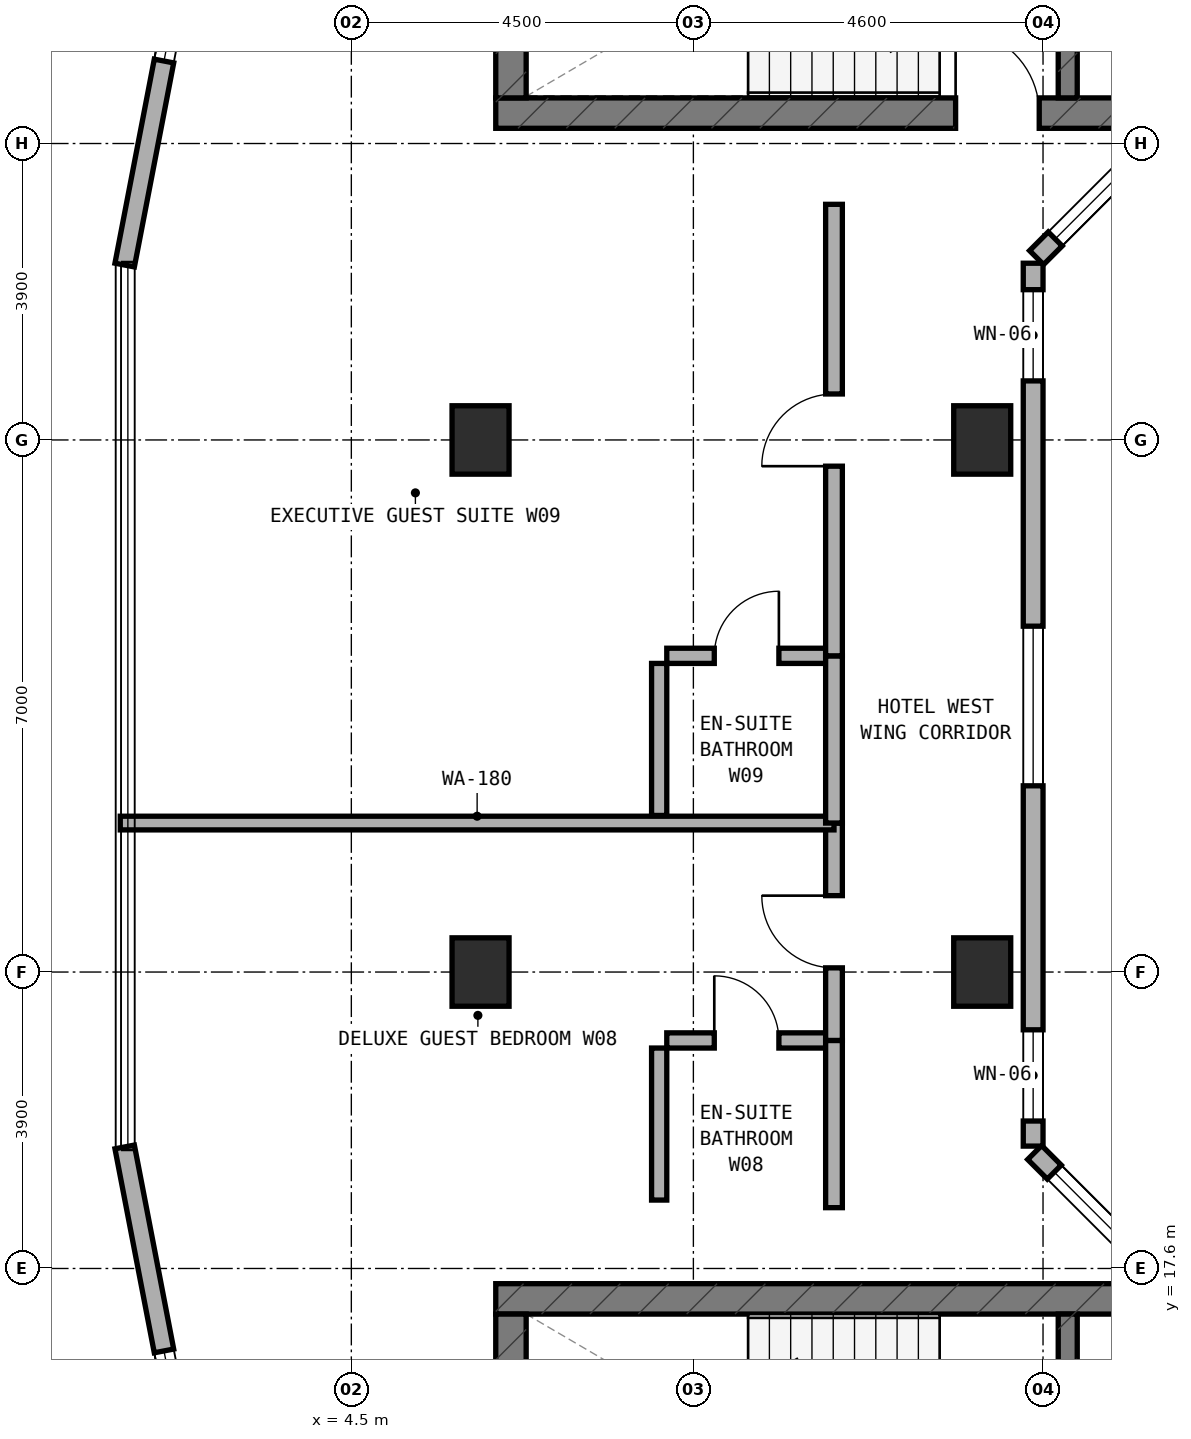
"""IFC4 building model, lengths in metres.
Left out: names, types, materials, properties, quantities, classifications, styles, units other than length and angle.
Written with IfcOpenShell. Run it as: python <this file> out.ifc"""

import sys

from ifc_helpers import new_model, si_unit, direction, frame, frame_2d, origin, origin_2d, place, context, subcontext, project, spatial, rectangle, extrude, element, fill, save


model = new_model("IFC4")
c1 = context("Model", 3, precision=1e-05, world=origin(), true_north=direction((0.0, 1.0)))
c2 = subcontext(c1, "Body", "Model", "MODEL_VIEW")
j1 = project(units=[si_unit("LENGTHUNIT", "METRE"), si_unit("PLANEANGLEUNIT", "RADIAN")], contexts=[c1])
p1 = place(None, origin())
s1 = spatial("IfcSite", under=j1, at=p1, CompositionType="ELEMENT")
p2 = place(p1, origin())
s2 = spatial("IfcBuilding", under=s1, at=p2, CompositionType="ELEMENT")
p3 = place(p2, frame((0.0, 0.0, 177.5)))
s3 = spatial("IfcBuildingStorey", under=s2, at=p3, CompositionType="ELEMENT", Elevation=177.5)
p4 = place(p3, frame((6.4, 32.8, 0.0), z_axis=(0.0, 0.0, 1.0), x_axis=(1.0, 0.0, 0.0)))
e1 = element("IfcWall", 1, at=p4, inside=s3, PredefinedType="SHEAR", context=c2, shape_type="SweptSolid", body=[
    extrude(rectangle(XDim=24.4, YDim=0.4, at=frame_2d((12.2, 0.0))), origin(), (0.0, 0.0, 1.0), 3.6),
])
p5 = place(p4, frame((6.05, 0.0, 0.0)))
e2 = element("IfcOpeningElement", 2, at=p5, cuts=e1, PredefinedType="OPENING", context=c2, shape_type="SweptSolid", body=[
    extrude(rectangle(XDim=1.1, YDim=2.15, at=frame_2d((0.55, 1.075))), frame((0.0, 0.21, 0.0), z_axis=(0.0, -1.0, 0.0), x_axis=(1.0, 0.0, 0.0)), (0.0, 0.0, 1.0), 0.42),
])
p6 = place(p3, frame((6.6, 33.0, 0.0), z_axis=(0.0, 0.0, 1.0), x_axis=(0.0, 1.0, 0.0)))
e3 = element("IfcWall", 3, at=p6, inside=s3, PredefinedType="SHEAR", context=c2, shape_type="SweptSolid", body=[
    extrude(rectangle(XDim=3.16, YDim=0.4, at=frame_2d((1.58, 0.0))), origin(), (0.0, 0.0, 1.0), 3.6),
])
p7 = place(p3, frame((13.925, 33.0, 0.0), z_axis=(0.0, 0.0, 1.0), x_axis=(0.0, 1.0, 0.0)))
e4 = element("IfcWall", 4, at=p7, inside=s3, PredefinedType="STANDARD", context=c2, shape_type="SweptSolid", body=[
    extrude(rectangle(XDim=3.16, YDim=0.25, at=frame_2d((1.58, 0.0))), origin(), (0.0, 0.0, 1.0), 3.32),
])
p8 = place(p7, frame((0.98, 0.0, 0.0)))
e5 = element("IfcOpeningElement", 5, at=p8, cuts=e4, PredefinedType="OPENING", context=c2, shape_type="SweptSolid", body=[
    extrude(rectangle(XDim=1.1, YDim=2.15, at=frame_2d((0.55, 1.075))), frame((0.0, 0.135, 0.0), z_axis=(0.0, -1.0, 0.0), x_axis=(1.0, 0.0, 0.0)), (0.0, 0.0, 1.0), 0.27),
])
p9 = place(p3, frame((6.4, 17.2, 0.0), z_axis=(0.0, 0.0, 1.0), x_axis=(1.0, 0.0, 0.0)))
e6 = element("IfcWall", 6, at=p9, inside=s3, PredefinedType="SHEAR", context=c2, shape_type="SweptSolid", body=[
    extrude(rectangle(XDim=24.4, YDim=0.4, at=frame_2d((12.2, 0.0))), origin(), (0.0, 0.0, 1.0), 3.6),
])
p10 = place(p3, frame((6.6, 13.84, 0.0), z_axis=(0.0, 0.0, 1.0), x_axis=(0.0, 1.0, 0.0)))
e7 = element("IfcWall", 7, at=p10, inside=s3, PredefinedType="SHEAR", context=c2, shape_type="SweptSolid", body=[
    extrude(rectangle(XDim=3.16, YDim=0.4, at=frame_2d((1.58, 0.0))), origin(), (0.0, 0.0, 1.0), 3.6),
])
p11 = place(p3, frame((13.925, 13.84, 0.0), z_axis=(0.0, 0.0, 1.0), x_axis=(0.0, 1.0, 0.0)))
e8 = element("IfcWall", 8, at=p11, inside=s3, PredefinedType="STANDARD", context=c2, shape_type="SweptSolid", body=[
    extrude(rectangle(XDim=3.16, YDim=0.25, at=frame_2d((1.58, 0.0))), origin(), (0.0, 0.0, 1.0), 3.32),
])
p12 = place(p11, frame((0.98, 0.0, 0.0)))
e9 = element("IfcOpeningElement", 9, at=p12, cuts=e8, PredefinedType="OPENING", context=c2, shape_type="SweptSolid", body=[
    extrude(rectangle(XDim=1.1, YDim=2.15, at=frame_2d((0.55, 1.075))), frame((0.0, 0.135, 0.0), z_axis=(0.0, -1.0, 0.0), x_axis=(1.0, 0.0, 0.0)), (0.0, 0.0, 1.0), 0.27),
])
for number, where, z_axis, x_axis in (
    (10, (6.2, 21.5, 0.0), (0.0, 0.0, 1.0), (1.0, 0.0, 0.0)),
    (11, (6.2, 28.5, 0.0), (0.0, 0.0, 1.0), (1.0, 0.0, 0.0)),
    (12, (12.8, 21.5, 0.0), (0.0, 0.0, 1.0), (1.0, 0.0, 0.0)),
    (13, (12.8, 28.5, 0.0), (0.0, 0.0, 1.0), (1.0, 0.0, 0.0)),
):
    element("IfcColumn", number, at=place(p3, frame(where, z_axis=z_axis, x_axis=x_axis)), inside=s3, PredefinedType="COLUMN", context=c2, shape_type="SweptSolid", body=[
        extrude(rectangle(XDim=0.75, YDim=0.9, at=origin_2d()), origin(), (0.0, 0.0, 1.0), 3.6),
    ])
p13 = place(p3, frame((15.278, 17.338, 0.0), z_axis=(0.0, 0.0, 1.0), x_axis=(-0.707106781187, 0.707106781187, 0.0)))
e14 = element("IfcWall", 14, at=p13, inside=s3, PredefinedType="STANDARD", context=c2, shape_type="SweptSolid", body=[
    extrude(rectangle(XDim=2.529, YDim=0.26, at=frame_2d((1.264, 0.0))), origin(), (0.0, 0.0, 1.0), 3.32),
])
p14 = place(p13, frame((0.364, 0.0, 0.85)))
e15 = element("IfcOpeningElement", 15, at=p14, cuts=e14, PredefinedType="OPENING", context=c2, shape_type="SweptSolid", body=[
    extrude(rectangle(XDim=1.8, YDim=1.5, at=frame_2d((0.9, 0.75))), frame((0.0, 0.14, 0.0), z_axis=(0.0, -1.0, 0.0), x_axis=(1.0, 0.0, 0.0)), (0.0, 0.0, 1.0), 0.28),
])
p15 = place(p3, frame((13.47, 19.21, 0.0), z_axis=(0.0, 0.0, 1.0), x_axis=(0.0, 1.0, 0.0)))
e16 = element("IfcWall", 16, at=p15, inside=s3, PredefinedType="STANDARD", context=c2, shape_type="SweptSolid", body=[
    extrude(rectangle(XDim=11.615, YDim=0.26, at=frame_2d((5.808, 0.0))), origin(), (0.0, 0.0, 1.0), 3.32),
])
p16 = place(p15, frame((0.33, 0.0, 0.5)))
e17 = element("IfcOpeningElement", 17, at=p16, cuts=e16, PredefinedType="OPENING", context=c2, shape_type="SweptSolid", body=[
    extrude(rectangle(XDim=1.2, YDim=1.9, at=frame_2d((0.6, 0.95))), frame((0.0, 0.14, 0.0), z_axis=(0.0, -1.0, 0.0), x_axis=(1.0, 0.0, 0.0)), (0.0, 0.0, 1.0), 0.28),
])
p17 = place(p15, frame((4.74, 0.0, 0.85)))
e18 = element("IfcOpeningElement", 18, at=p17, cuts=e16, PredefinedType="OPENING", context=c2, shape_type="SweptSolid", body=[
    extrude(rectangle(XDim=2.1, YDim=1.5, at=frame_2d((1.05, 0.75))), frame((0.0, 0.14, 0.0), z_axis=(0.0, -1.0, 0.0), x_axis=(1.0, 0.0, 0.0)), (0.0, 0.0, 1.0), 0.28),
])
p18 = place(p15, frame((10.067, 0.0, 0.5)))
e19 = element("IfcOpeningElement", 19, at=p18, cuts=e16, PredefinedType="OPENING", context=c2, shape_type="SweptSolid", body=[
    extrude(rectangle(XDim=1.2, YDim=1.9, at=frame_2d((0.6, 0.95))), frame((0.0, 0.14, 0.0), z_axis=(0.0, -1.0, 0.0), x_axis=(1.0, 0.0, 0.0)), (0.0, 0.0, 1.0), 0.28),
])
p19 = place(p3, frame((13.515, 30.899, 0.0), z_axis=(0.0, 0.0, 1.0), x_axis=(0.707106781187, 0.707106781187, 0.0)))
e20 = element("IfcWall", 20, at=p19, inside=s3, PredefinedType="STANDARD", context=c2, shape_type="SweptSolid", body=[
    extrude(rectangle(XDim=2.493, YDim=0.26, at=frame_2d((1.247, 0.0))), origin(), (0.0, 0.0, 1.0), 3.32),
])
p20 = place(p19, frame((0.347, 0.0, 0.85)))
e21 = element("IfcOpeningElement", 21, at=p20, cuts=e20, PredefinedType="OPENING", context=c2, shape_type="SweptSolid", body=[
    extrude(rectangle(XDim=1.8, YDim=1.5, at=frame_2d((0.9, 0.75))), frame((0.0, 0.14, 0.0), z_axis=(0.0, -1.0, 0.0), x_axis=(1.0, 0.0, 0.0)), (0.0, 0.0, 1.0), 0.28),
])
p21 = place(p3, frame((3.23, 39.683, 0.0), z_axis=(0.0, 0.0, 1.0), x_axis=(-0.189254809039, -0.98192801022, 0.0)))
e22 = element("IfcWall", 22, at=p21, inside=s3, PredefinedType="STANDARD", context=c2, shape_type="SweptSolid", body=[
    extrude(rectangle(XDim=9.046, YDim=0.26, at=frame_2d((4.523, 0.0))), origin(), (0.0, 0.0, 1.0), 3.32),
])
p22 = place(p21, frame((4.212, 0.0, 0.85)))
e23 = element("IfcOpeningElement", 23, at=p22, cuts=e22, PredefinedType="OPENING", context=c2, shape_type="SweptSolid", body=[
    extrude(rectangle(XDim=2.1, YDim=1.5, at=frame_2d((1.05, 0.75))), frame((0.0, 0.14, 0.0), z_axis=(0.0, -1.0, 0.0), x_axis=(1.0, 0.0, 0.0)), (0.0, 0.0, 1.0), 0.28),
])
p23 = place(p3, frame((1.518, 19.199, 0.0), z_axis=(0.0, 0.0, 1.0), x_axis=(0.189254809039, -0.98192801022, 0.0)))
e24 = element("IfcWall", 24, at=p23, inside=s3, PredefinedType="STANDARD", context=c2, shape_type="SweptSolid", body=[
    extrude(rectangle(XDim=9.046, YDim=0.26, at=frame_2d((4.523, 0.0))), origin(), (0.0, 0.0, 1.0), 3.32),
])
p24 = place(p23, frame((2.733, 0.0, 0.85)))
e25 = element("IfcOpeningElement", 25, at=p24, cuts=e24, PredefinedType="OPENING", context=c2, shape_type="SweptSolid", body=[
    extrude(rectangle(XDim=2.1, YDim=1.5, at=frame_2d((1.05, 0.75))), frame((0.0, 0.14, 0.0), z_axis=(0.0, -1.0, 0.0), x_axis=(1.0, 0.0, 0.0)), (0.0, 0.0, 1.0), 0.28),
])
p25 = place(p3, frame((8.65, 20.6, 0.0), z_axis=(0.0, 0.0, 1.0), x_axis=(1.0, 0.0, 0.0)))
e26 = element("IfcWall", 26, at=p25, inside=s3, PredefinedType="PLUMBINGWALL", context=c2, shape_type="SweptSolid", body=[
    extrude(rectangle(XDim=2.1, YDim=0.2, at=frame_2d((1.05, 0.0))), origin(), (0.0, 0.0, 1.0), 3.32),
])
p26 = place(p25, frame((0.625, 0.0, 0.0)))
e27 = element("IfcOpeningElement", 27, at=p26, cuts=e26, PredefinedType="OPENING", context=c2, shape_type="SweptSolid", body=[
    extrude(rectangle(XDim=0.85, YDim=2.1, at=frame_2d((0.425, 1.05))), frame((0.0, 0.11, 0.0), z_axis=(0.0, -1.0, 0.0), x_axis=(1.0, 0.0, 0.0)), (0.0, 0.0, 1.0), 0.22),
])
p27 = place(p3, frame((8.55, 18.5, 0.0), z_axis=(0.0, 0.0, 1.0), x_axis=(0.0, 1.0, 0.0)))
e28 = element("IfcWall", 28, at=p27, inside=s3, PredefinedType="PLUMBINGWALL", context=c2, shape_type="SweptSolid", body=[
    extrude(rectangle(XDim=2.0, YDim=0.2, at=frame_2d((1.0, 0.0))), origin(), (0.0, 0.0, 1.0), 3.32),
])
p28 = place(p3, frame((10.85, 18.4, 0.0), z_axis=(0.0, 0.0, 1.0), x_axis=(0.0, 1.0, 0.0)))
e29 = element("IfcWall", 29, at=p28, inside=s3, PredefinedType="SOLIDWALL", context=c2, shape_type="SweptSolid", body=[
    extrude(rectangle(XDim=2.2, YDim=0.22, at=frame_2d((1.1, 0.0))), origin(), (0.0, 0.0, 1.0), 3.32),
])
p29 = place(p3, frame((10.85, 20.6, 0.0), z_axis=(0.0, 0.0, 1.0), x_axis=(0.0, 1.0, 0.0)))
e30 = element("IfcWall", 30, at=p29, inside=s3, PredefinedType="SOLIDWALL", context=c2, shape_type="SweptSolid", body=[
    extrude(rectangle(XDim=2.86, YDim=0.22, at=frame_2d((1.43, 0.0))), origin(), (0.0, 0.0, 1.0), 2.995),
])
p30 = place(p29, frame((0.955, 0.0, 0.0)))
e31 = element("IfcOpeningElement", 31, at=p30, cuts=e30, PredefinedType="OPENING", context=c2, shape_type="SweptSolid", body=[
    extrude(rectangle(XDim=0.95, YDim=2.1, at=frame_2d((0.475, 1.05))), frame((0.0, 0.12, 0.0), z_axis=(0.0, -1.0, 0.0), x_axis=(1.0, 0.0, 0.0)), (0.0, 0.0, 1.0), 0.24),
])
p31 = place(p3, frame((1.46, 23.46, 0.0), z_axis=(0.0, 0.0, 1.0), x_axis=(1.0, 0.0, 0.0)))
e32 = element("IfcWall", 32, at=p31, inside=s3, PredefinedType="SOLIDWALL", context=c2, shape_type="SweptSolid", body=[
    extrude(rectangle(XDim=9.39, YDim=0.18, at=frame_2d((4.695, 0.0))), origin(), (0.0, 0.0, 1.0), 2.935),
])
p32 = place(p3, frame((8.65, 25.66, 0.0), z_axis=(0.0, 0.0, 1.0), x_axis=(1.0, 0.0, 0.0)))
e33 = element("IfcWall", 33, at=p32, inside=s3, PredefinedType="PLUMBINGWALL", context=c2, shape_type="SweptSolid", body=[
    extrude(rectangle(XDim=2.1, YDim=0.2, at=frame_2d((1.05, 0.0))), origin(), (0.0, 0.0, 1.0), 3.32),
])
p33 = place(p32, frame((0.625, 0.0, 0.0)))
e34 = element("IfcOpeningElement", 34, at=p33, cuts=e33, PredefinedType="OPENING", context=c2, shape_type="SweptSolid", body=[
    extrude(rectangle(XDim=0.85, YDim=2.1, at=frame_2d((0.425, 1.05))), frame((0.0, 0.11, 0.0), z_axis=(0.0, -1.0, 0.0), x_axis=(1.0, 0.0, 0.0)), (0.0, 0.0, 1.0), 0.22),
])
p34 = place(p3, frame((8.55, 23.56, 0.0), z_axis=(0.0, 0.0, 1.0), x_axis=(0.0, 1.0, 0.0)))
e35 = element("IfcWall", 35, at=p34, inside=s3, PredefinedType="PLUMBINGWALL", context=c2, shape_type="SweptSolid", body=[
    extrude(rectangle(XDim=2.0, YDim=0.2, at=frame_2d((1.0, 0.0))), origin(), (0.0, 0.0, 1.0), 3.32),
])
p35 = place(p3, frame((10.85, 23.46, 0.0), z_axis=(0.0, 0.0, 1.0), x_axis=(0.0, 1.0, 0.0)))
e36 = element("IfcWall", 36, at=p35, inside=s3, PredefinedType="SOLIDWALL", context=c2, shape_type="SweptSolid", body=[
    extrude(rectangle(XDim=2.2, YDim=0.22, at=frame_2d((1.1, 0.0))), origin(), (0.0, 0.0, 1.0), 3.32),
])
p36 = place(p3, frame((10.85, 25.66, 0.0), z_axis=(0.0, 0.0, 1.0), x_axis=(0.0, 1.0, 0.0)))
e37 = element("IfcWall", 37, at=p36, inside=s3, PredefinedType="SOLIDWALL", context=c2, shape_type="SweptSolid", body=[
    extrude(rectangle(XDim=5.94, YDim=0.22, at=frame_2d((2.97, 0.0))), origin(), (0.0, 0.0, 1.0), 2.995),
])
p37 = place(p36, frame((2.495, 0.0, 0.0)))
e38 = element("IfcOpeningElement", 38, at=p37, cuts=e37, PredefinedType="OPENING", context=c2, shape_type="SweptSolid", body=[
    extrude(rectangle(XDim=0.95, YDim=2.1, at=frame_2d((0.475, 1.05))), frame((0.0, 0.12, 0.0), z_axis=(0.0, -1.0, 0.0), x_axis=(1.0, 0.0, 0.0)), (0.0, 0.0, 1.0), 0.24),
])
p38 = place(p14, origin())
e39 = element("IfcWindow", 39, at=p38, inside=s3, PartitioningType="SINGLE_PANEL", PredefinedType="WINDOW", context=c2, shape_type="SweptSolid", body=[
    extrude(rectangle(XDim=1.8, YDim=1.5, at=frame_2d((0.9, 0.75))), frame((0.0, 0.03, 0.0), z_axis=(0.0, -1.0, 0.0), x_axis=(1.0, 0.0, 0.0)), (0.0, 0.0, 1.0), 0.06),
])
fill(e15, e39)
p39 = place(p16, origin())
e40 = element("IfcWindow", 40, at=p39, inside=s3, PartitioningType="SINGLE_PANEL", PredefinedType="WINDOW", context=c2, shape_type="SweptSolid", body=[
    extrude(rectangle(XDim=1.2, YDim=1.9, at=frame_2d((0.6, 0.95))), frame((0.0, 0.03, 0.0), z_axis=(0.0, -1.0, 0.0), x_axis=(1.0, 0.0, 0.0)), (0.0, 0.0, 1.0), 0.06),
])
fill(e17, e40)
p40 = place(p17, origin())
e41 = element("IfcWindow", 41, at=p40, inside=s3, PartitioningType="SINGLE_PANEL", PredefinedType="WINDOW", context=c2, shape_type="SweptSolid", body=[
    extrude(rectangle(XDim=2.1, YDim=1.5, at=frame_2d((1.05, 0.75))), frame((0.0, 0.03, 0.0), z_axis=(0.0, -1.0, 0.0), x_axis=(1.0, 0.0, 0.0)), (0.0, 0.0, 1.0), 0.06),
])
fill(e18, e41)
p41 = place(p18, origin())
e42 = element("IfcWindow", 42, at=p41, inside=s3, PartitioningType="SINGLE_PANEL", PredefinedType="WINDOW", context=c2, shape_type="SweptSolid", body=[
    extrude(rectangle(XDim=1.2, YDim=1.9, at=frame_2d((0.6, 0.95))), frame((0.0, 0.03, 0.0), z_axis=(0.0, -1.0, 0.0), x_axis=(1.0, 0.0, 0.0)), (0.0, 0.0, 1.0), 0.06),
])
fill(e19, e42)
p42 = place(p20, origin())
e43 = element("IfcWindow", 43, at=p42, inside=s3, PartitioningType="SINGLE_PANEL", PredefinedType="WINDOW", context=c2, shape_type="SweptSolid", body=[
    extrude(rectangle(XDim=1.8, YDim=1.5, at=frame_2d((0.9, 0.75))), frame((0.0, 0.03, 0.0), z_axis=(0.0, -1.0, 0.0), x_axis=(1.0, 0.0, 0.0)), (0.0, 0.0, 1.0), 0.06),
])
fill(e21, e43)
p43 = place(p22, origin())
e44 = element("IfcWindow", 44, at=p43, inside=s3, PartitioningType="SINGLE_PANEL", PredefinedType="WINDOW", context=c2, shape_type="SweptSolid", body=[
    extrude(rectangle(XDim=2.1, YDim=1.5, at=frame_2d((1.05, 0.75))), frame((0.0, 0.03, 0.0), z_axis=(0.0, -1.0, 0.0), x_axis=(1.0, 0.0, 0.0)), (0.0, 0.0, 1.0), 0.06),
])
fill(e23, e44)
p44 = place(p24, origin())
e45 = element("IfcWindow", 45, at=p44, inside=s3, PartitioningType="SINGLE_PANEL", PredefinedType="WINDOW", context=c2, shape_type="SweptSolid", body=[
    extrude(rectangle(XDim=2.1, YDim=1.5, at=frame_2d((1.05, 0.75))), frame((0.0, 0.03, 0.0), z_axis=(0.0, -1.0, 0.0), x_axis=(1.0, 0.0, 0.0)), (0.0, 0.0, 1.0), 0.06),
])
fill(e25, e45)
p45 = place(p5, origin())
e46 = element("IfcDoor", 46, at=p45, inside=s3, OperationType="SINGLE_SWING_LEFT", PredefinedType="DOOR", context=c2, shape_type="SweptSolid", body=[
    extrude(rectangle(XDim=1.1, YDim=2.15, at=frame_2d((0.55, 1.075))), frame((0.0, 0.025, 0.0), z_axis=(0.0, -1.0, 0.0), x_axis=(1.0, 0.0, 0.0)), (0.0, 0.0, 1.0), 0.05),
])
fill(e2, e46)
p46 = place(p26, origin())
e47 = element("IfcDoor", 47, at=p46, inside=s3, OperationType="SINGLE_SWING_LEFT", PredefinedType="DOOR", context=c2, shape_type="SweptSolid", body=[
    extrude(rectangle(XDim=0.85, YDim=2.1, at=frame_2d((0.425, 1.05))), frame((0.0, 0.025, 0.0), z_axis=(0.0, -1.0, 0.0), x_axis=(1.0, 0.0, 0.0)), (0.0, 0.0, 1.0), 0.05),
])
fill(e27, e47)
p47 = place(p30, origin())
e48 = element("IfcDoor", 48, at=p47, inside=s3, OperationType="SINGLE_SWING_RIGHT", PredefinedType="DOOR", context=c2, shape_type="SweptSolid", body=[
    extrude(rectangle(XDim=0.95, YDim=2.1, at=frame_2d((0.475, 1.05))), frame((0.0, 0.025, 0.0), z_axis=(0.0, -1.0, 0.0), x_axis=(1.0, 0.0, 0.0)), (0.0, 0.0, 1.0), 0.05),
])
fill(e31, e48)
p48 = place(p33, origin())
e49 = element("IfcDoor", 49, at=p48, inside=s3, OperationType="SINGLE_SWING_RIGHT", PredefinedType="DOOR", context=c2, shape_type="SweptSolid", body=[
    extrude(rectangle(XDim=0.85, YDim=2.1, at=frame_2d((0.425, 1.05))), frame((0.0, 0.025, 0.0), z_axis=(0.0, -1.0, 0.0), x_axis=(1.0, 0.0, 0.0)), (0.0, 0.0, 1.0), 0.05),
])
fill(e34, e49)
p49 = place(p37, origin())
e50 = element("IfcDoor", 50, at=p49, inside=s3, OperationType="SINGLE_SWING_LEFT", PredefinedType="DOOR", context=c2, shape_type="SweptSolid", body=[
    extrude(rectangle(XDim=0.95, YDim=2.1, at=frame_2d((0.475, 1.05))), frame((0.0, 0.025, 0.0), z_axis=(0.0, -1.0, 0.0), x_axis=(1.0, 0.0, 0.0)), (0.0, 0.0, 1.0), 0.05),
])
fill(e38, e50)
save(model, sys.argv[1])
